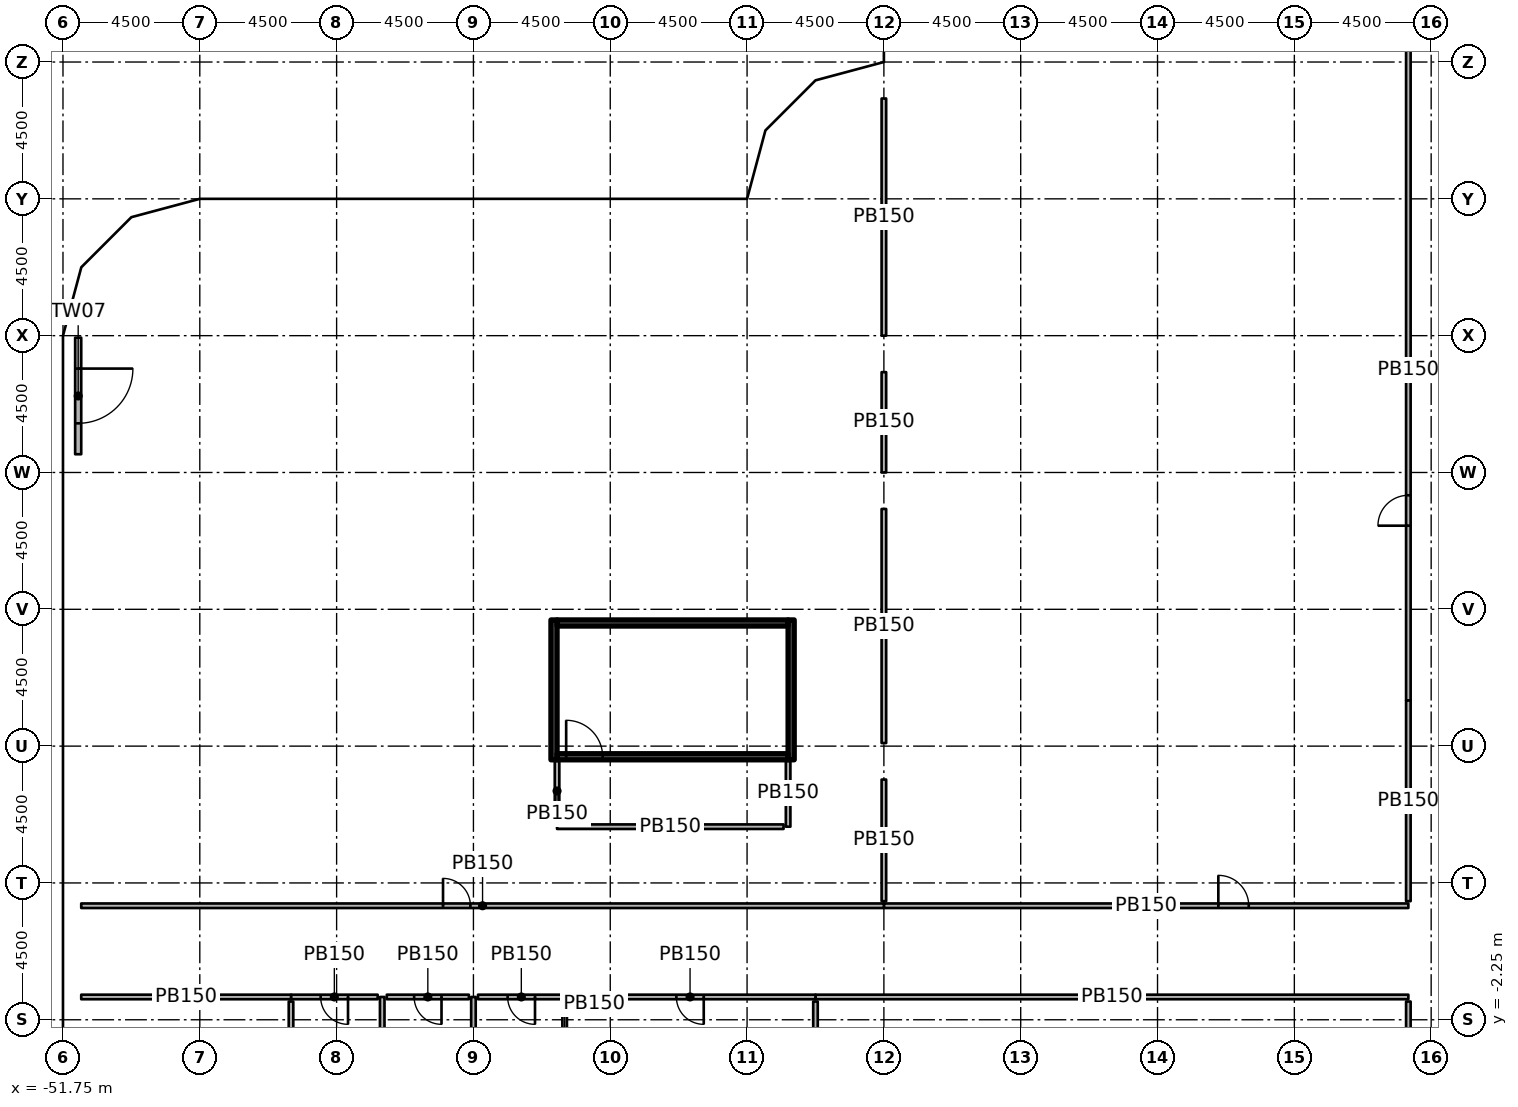
"""IFC4 building model, lengths in metres.
Left out: names, types, materials, properties, quantities, classifications, styles, units other than length and angle.
Written with IfcOpenShell. Run it as: python <this file> out.ifc"""

import sys

from ifc_helpers import new_model, si_unit, direction, frame, frame_2d, origin, origin_2d, place, context, subcontext, project, spatial, rectangle, extrude, element, fill, save


model = new_model("IFC4")
c1 = context("Model", 3, precision=1e-05, world=origin(), true_north=direction((0.0, 1.0)))
c2 = subcontext(c1, "Body", "Model", "MODEL_VIEW")
j1 = project(units=[si_unit("LENGTHUNIT", "METRE"), si_unit("PLANEANGLEUNIT", "RADIAN")], contexts=[c1])
p1 = place(None, origin())
s1 = spatial("IfcSite", under=j1, at=p1, CompositionType="ELEMENT")
p2 = place(p1, origin())
s2 = spatial("IfcBuilding", under=s1, at=p2, CompositionType="ELEMENT")
p3 = place(p2, frame((0.0, 0.0, 7.0)))
s3 = spatial("IfcBuildingStorey", under=s2, at=p3, CompositionType="ELEMENT", Elevation=7.0)
for number, where, z_axis, x_axis in (
    (1, (-51.15, 2.25, 0.0), (0.0, 0.0, 1.0), (1.0, 0.0, 0.0)),
    (2, (-51.15, 15.75, 0.0), (0.0, 0.0, 1.0), (1.0, 0.0, 0.0)),
    (3, (-46.65, -2.25, 0.0), (0.0, 0.0, 1.0), (1.0, 0.0, 0.0)),
    (4, (-46.65, 11.25, 0.0), (0.0, 0.0, 1.0), (1.0, 0.0, 0.0)),
    (5, (-47.25, 23.97, 0.0), (0.0, 0.0, 1.0), (1.0, 0.0, 0.0)),
    (6, (-42.15, 6.75, 0.0), (0.0, 0.0, 1.0), (1.0, 0.0, 0.0)),
    (7, (-42.75, 19.47, 0.0), (0.0, 0.0, 1.0), (1.0, 0.0, 0.0)),
    (8, (-37.65, 2.25, 0.0), (0.0, 0.0, 1.0), (1.0, 0.0, 0.0)),
    (9, (-38.25, 14.97, 0.0), (0.0, 0.0, 1.0), (1.0, 0.0, 0.0)),
    (10, (-33.11, -2.25, 0.0), (0.0, 0.0, 1.0), (1.0, 0.0, 0.0)),
    (11, (-33.11, 2.25, 0.0), (0.0, 0.0, 1.0), (1.0, 0.0, 0.0)),
    (12, (-33.75, 24.15, 0.0), (0.0, 0.0, 1.0), (1.0, 0.0, 0.0)),
    (13, (-28.908, 5.475, 0.0), (0.0, 0.0, 1.0), (1.0, 0.0, 0.0)),
    (14, (-29.25, 19.65, 0.0), (0.0, 0.0, 1.0), (1.0, 0.0, 0.0)),
    (15, (-28.65, 24.15, 0.0), (0.0, 0.0, 1.0), (1.0, 0.0, 0.0)),
    (16, (-24.75, 6.25, 0.0), (0.0, 0.0, 1.0), (1.0, 0.0, 0.0)),
    (17, (-24.75, 15.15, 0.0), (0.0, 0.0, 1.0), (1.0, 0.0, 0.0)),
    (18, (-24.15, 19.65, 0.0), (0.0, 0.0, 1.0), (1.0, 0.0, 0.0)),
    (19, (-24.15, 28.65, 0.0), (0.0, 0.0, 1.0), (1.0, 0.0, 0.0)),
    (20, (-20.25, 6.11, 0.0), (0.0, 0.0, 1.0), (1.0, 0.0, 0.0)),
    (21, (-20.25, 10.65, 0.0), (0.0, 0.0, 1.0), (1.0, 0.0, 0.0)),
    (22, (-19.65, 15.15, 0.0), (0.0, 0.0, 1.0), (1.0, 0.0, 0.0)),
    (23, (-19.65, 24.15, 0.0), (0.0, 0.0, 1.0), (1.0, 0.0, 0.0)),
    (24, (-15.75, 6.25, 0.0), (0.0, 0.0, 1.0), (1.0, 0.0, 0.0)),
    (25, (-15.15, 10.65, 0.0), (0.0, 0.0, 1.0), (1.0, 0.0, 0.0)),
    (26, (-15.15, 19.65, 0.0), (0.0, 0.0, 1.0), (1.0, 0.0, 0.0)),
    (27, (-10.75, 6.25, 0.0), (0.0, 0.0, 1.0), (1.0, 0.0, 0.0)),
    (28, (-10.65, 15.15, 0.0), (0.0, 0.0, 1.0), (1.0, 0.0, 0.0)),
    (29, (-10.65, 29.25, 0.0), (0.0, 0.0, 1.0), (1.0, 0.0, 0.0)),
    (30, (-6.25, 6.25, 0.0), (0.0, 0.0, 1.0), (1.0, 0.0, 0.0)),
    (31, (-6.25, 10.75, 0.0), (0.0, 0.0, 1.0), (1.0, 0.0, 0.0)),
    (32, (-6.25, 15.75, 0.0), (0.0, 0.0, 1.0), (1.0, 0.0, 0.0)),
    (33, (-6.25, 20.25, 0.0), (0.0, 0.0, 1.0), (1.0, 0.0, 0.0)),
    (34, (-6.25, 24.65, 0.0), (0.0, 0.0, 1.0), (1.0, 0.0, 0.0)),
    (35, (-6.25, 26.7, 0.0), (0.0, 0.0, 1.0), (1.0, 0.0, 0.0)),
):
    element("IfcColumn", number, at=place(p3, frame(where, z_axis=z_axis, x_axis=x_axis)), inside=s3, PredefinedType="COLUMN", context=c2, shape_type="SweptSolid", body=[
        extrude(rectangle(XDim=1.2, YDim=1.2, at=origin_2d()), origin(), (0.0, 0.0, 1.0), 4.55),
    ])
p4 = place(p3, frame((-51.25, 20.184, 0.0), z_axis=(0.0, 0.0, 1.0), x_axis=(0.0, -1.0, 0.0)))
e36 = element("IfcWall", 36, at=p4, inside=s3, PredefinedType="SOLIDWALL", context=c2, shape_type="SweptSolid", body=[
    extrude(rectangle(XDim=3.834, YDim=0.2, at=frame_2d((1.917, 0.0))), origin(), (0.0, 0.0, 1.0), 4.55),
])
p5 = place(p4, frame((1.017, 0.0, 0.0)))
e37 = element("IfcOpeningElement", 37, at=p5, cuts=e36, PredefinedType="OPENING", context=c2, shape_type="SweptSolid", body=[
    extrude(rectangle(XDim=1.8, YDim=2.4, at=frame_2d((0.9, 1.2))), frame((0.0, 0.11, 0.0), z_axis=(0.0, -1.0, 0.0), x_axis=(1.0, 0.0, 0.0)), (0.0, 0.0, 1.0), 0.22),
])
for number, where, z_axis, x_axis in (
    (38, (-35.6, 6.3, 0.0), (0.0, 0.0, 1.0), (0.0, 1.0, 0.0)),
    (39, (-27.8, 6.3, 0.0), (0.0, 0.0, 1.0), (0.0, 1.0, 0.0)),
):
    element("IfcWall", number, at=place(p3, frame(where, z_axis=z_axis, x_axis=x_axis)), inside=s3, PredefinedType="SHEAR", context=c2, shape_type="SweptSolid", body=[
        extrude(rectangle(XDim=4.6, YDim=0.2, at=frame_2d((2.3, 0.0))), origin(), (0.0, 0.0, 1.0), 4.55),
    ])
p6 = place(p3, frame((-35.5, 6.4, 0.0), z_axis=(0.0, 0.0, 1.0), x_axis=(1.0, 0.0, 0.0)))
e40 = element("IfcWall", 40, at=p6, inside=s3, PredefinedType="SHEAR", context=c2, shape_type="SweptSolid", body=[
    extrude(rectangle(XDim=7.6, YDim=0.2, at=frame_2d((3.8, 0.0))), origin(), (0.0, 0.0, 1.0), 4.55),
])
p7 = place(p6, frame((0.3, 0.0, 0.0)))
e41 = element("IfcOpeningElement", 41, at=p7, cuts=e40, PredefinedType="OPENING", context=c2, shape_type="SweptSolid", body=[
    extrude(rectangle(XDim=1.2, YDim=2.1, at=frame_2d((0.6, 1.05))), frame((0.0, 0.11, 0.0), z_axis=(0.0, -1.0, 0.0), x_axis=(1.0, 0.0, 0.0)), (0.0, 0.0, 1.0), 0.22),
])
p8 = place(p3, frame((-35.5, 10.8, 0.0), z_axis=(0.0, 0.0, 1.0), x_axis=(1.0, 0.0, 0.0)))
e42 = element("IfcWall", 42, at=p8, inside=s3, PredefinedType="SHEAR", context=c2, shape_type="SweptSolid", body=[
    extrude(rectangle(XDim=7.6, YDim=0.2, at=frame_2d((3.8, 0.0))), origin(), (0.0, 0.0, 1.0), 4.55),
])
p9 = place(p3, frame((-27.9, 6.3, 0.0), z_axis=(0.0, 0.0, 1.0), x_axis=(0.0, -1.0, 0.0)))
e43 = element("IfcWall", 43, at=p9, inside=s3, PredefinedType="PARTITIONING", context=c2, shape_type="SweptSolid", body=[
    extrude(rectangle(XDim=2.2, YDim=0.15, at=frame_2d((1.1, 0.0))), origin(), (0.0, 0.0, 1.0), 4.55),
])
p10 = place(p3, frame((-28.05, 4.1, 0.0), z_axis=(0.0, 0.0, 1.0), x_axis=(-1.0, 0.0, 0.0)))
e44 = element("IfcWall", 44, at=p10, inside=s3, PredefinedType="PARTITIONING", context=c2, shape_type="SweptSolid", body=[
    extrude(rectangle(XDim=7.45, YDim=0.15, at=frame_2d((3.725, 0.0))), origin(), (0.0, 0.0, 1.0), 4.55),
])
p11 = place(p3, frame((-35.5, 4.25, 0.0), z_axis=(0.0, 0.0, 1.0), x_axis=(0.0, 1.0, 0.0)))
e45 = element("IfcWall", 45, at=p11, inside=s3, PredefinedType="PARTITIONING", context=c2, shape_type="SweptSolid", body=[
    extrude(rectangle(XDim=2.05, YDim=0.15, at=frame_2d((1.025, 0.0))), origin(), (0.0, 0.0, 1.0), 4.55),
])
p12 = place(p3, frame((-41.25, -1.5, 0.0), z_axis=(0.0, 0.0, 1.0), x_axis=(0.0, -1.0, 0.0)))
e46 = element("IfcWall", 46, at=p12, inside=s3, PredefinedType="PARTITIONING", context=c2, shape_type="SweptSolid", body=[
    extrude(rectangle(XDim=6.0, YDim=0.15, at=frame_2d((3.0, 0.0))), origin(), (0.0, 0.0, 1.0), 4.55),
])
p13 = place(p3, frame((-41.4, -1.5, 0.0), z_axis=(0.0, 0.0, 1.0), x_axis=(-1.0, 0.0, 0.0)))
e47 = element("IfcWall", 47, at=p13, inside=s3, PredefinedType="PARTITIONING", context=c2, shape_type="SweptSolid", body=[
    extrude(rectangle(XDim=2.85, YDim=0.15, at=frame_2d((1.425, 0.0))), origin(), (0.0, 0.0, 1.0), 4.55),
])
p14 = place(p13, frame((0.975, 0.0, 0.0)))
e48 = element("IfcOpeningElement", 48, at=p14, cuts=e47, PredefinedType="OPENING", context=c2, shape_type="SweptSolid", body=[
    extrude(rectangle(XDim=0.9, YDim=2.1, at=frame_2d((0.45, 1.05))), frame((0.0, 0.085, 0.0), z_axis=(0.0, -1.0, 0.0), x_axis=(1.0, 0.0, 0.0)), (0.0, 0.0, 1.0), 0.17),
])
p15 = place(p3, frame((-44.25, -7.35, 0.0), z_axis=(0.0, 0.0, 1.0), x_axis=(0.0, 1.0, 0.0)))
e49 = element("IfcWall", 49, at=p15, inside=s3, PredefinedType="PARTITIONING", context=c2, shape_type="SweptSolid", body=[
    extrude(rectangle(XDim=5.7, YDim=0.15, at=frame_2d((2.85, 0.0))), origin(), (0.0, 0.0, 1.0), 4.55),
])
p16 = place(p3, frame((-38.25, -1.5, 0.0), z_axis=(0.0, 0.0, 1.0), x_axis=(0.0, -1.0, 0.0)))
e50 = element("IfcWall", 50, at=p16, inside=s3, PredefinedType="PARTITIONING", context=c2, shape_type="SweptSolid", body=[
    extrude(rectangle(XDim=6.0, YDim=0.15, at=frame_2d((3.0, 0.0))), origin(), (0.0, 0.0, 1.0), 4.55),
])
p17 = place(p3, frame((-38.4, -1.5, 0.0), z_axis=(0.0, 0.0, 1.0), x_axis=(-1.0, 0.0, 0.0)))
e51 = element("IfcWall", 51, at=p17, inside=s3, PredefinedType="PARTITIONING", context=c2, shape_type="SweptSolid", body=[
    extrude(rectangle(XDim=2.7, YDim=0.15, at=frame_2d((1.35, 0.0))), origin(), (0.0, 0.0, 1.0), 4.55),
])
p18 = place(p17, frame((0.9, 0.0, 0.0)))
e52 = element("IfcOpeningElement", 52, at=p18, cuts=e51, PredefinedType="OPENING", context=c2, shape_type="SweptSolid", body=[
    extrude(rectangle(XDim=0.9, YDim=2.1, at=frame_2d((0.45, 1.05))), frame((0.0, 0.085, 0.0), z_axis=(0.0, -1.0, 0.0), x_axis=(1.0, 0.0, 0.0)), (0.0, 0.0, 1.0), 0.17),
])
p19 = place(p3, frame((-35.25, -1.5, 0.0), z_axis=(0.0, 0.0, 1.0), x_axis=(-1.0, 0.0, 0.0)))
e53 = element("IfcWall", 53, at=p19, inside=s3, PredefinedType="PARTITIONING", context=c2, shape_type="SweptSolid", body=[
    extrude(rectangle(XDim=2.85, YDim=0.15, at=frame_2d((1.425, 0.0))), origin(), (0.0, 0.0, 1.0), 4.55),
])
p20 = place(p19, frame((0.975, 0.0, 0.0)))
e54 = element("IfcOpeningElement", 54, at=p20, cuts=e53, PredefinedType="OPENING", context=c2, shape_type="SweptSolid", body=[
    extrude(rectangle(XDim=0.9, YDim=2.1, at=frame_2d((0.45, 1.05))), frame((0.0, 0.085, 0.0), z_axis=(0.0, -1.0, 0.0), x_axis=(1.0, 0.0, 0.0)), (0.0, 0.0, 1.0), 0.17),
])
p21 = place(p3, frame((-35.25, -1.65, 0.0), z_axis=(0.0, 0.0, 1.0), x_axis=(0.0, -1.0, 0.0)))
e55 = element("IfcWall", 55, at=p21, inside=s3, PredefinedType="PARTITIONING", context=c2, shape_type="SweptSolid", body=[
    extrude(rectangle(XDim=2.1, YDim=0.15, at=frame_2d((1.05, 0.0))), origin(), (0.0, 0.0, 1.0), 4.55),
])
p22 = place(p3, frame((-7.5, 8.25, 0.0), z_axis=(0.0, 0.0, 1.0), x_axis=(0.0, 1.0, 0.0)))
e56 = element("IfcWall", 56, at=p22, inside=s3, PredefinedType="PARTITIONING", context=c2, shape_type="SweptSolid", body=[
    extrude(rectangle(XDim=21.75, YDim=0.15, at=frame_2d((10.875, 0.0))), origin(), (0.0, 0.0, 1.0), 4.55),
])
p23 = place(p22, frame((5.75, 0.0, 0.0)))
e57 = element("IfcOpeningElement", 57, at=p23, cuts=e56, PredefinedType="OPENING", context=c2, shape_type="SweptSolid", body=[
    extrude(rectangle(XDim=1.0, YDim=2.1, at=frame_2d((0.5, 1.05))), frame((0.0, 0.085, 0.0), z_axis=(0.0, -1.0, 0.0), x_axis=(1.0, 0.0, 0.0)), (0.0, 0.0, 1.0), 0.17),
])
p24 = place(p3, frame((-24.75, 1.5, 0.0), z_axis=(0.0, 0.0, 1.0), x_axis=(1.0, 0.0, 0.0)))
e58 = element("IfcWall", 58, at=p24, inside=s3, PredefinedType="PARTITIONING", context=c2, shape_type="SweptSolid", body=[
    extrude(rectangle(XDim=17.25, YDim=0.15, at=frame_2d((8.625, 0.0))), origin(), (0.0, 0.0, 1.0), 4.55),
])
p25 = place(p24, frame((11.0, 0.0, 0.0)))
e59 = element("IfcOpeningElement", 59, at=p25, cuts=e58, PredefinedType="OPENING", context=c2, shape_type="SweptSolid", body=[
    extrude(rectangle(XDim=1.0, YDim=2.1, at=frame_2d((0.5, 1.05))), frame((0.0, 0.085, 0.0), z_axis=(0.0, -1.0, 0.0), x_axis=(1.0, 0.0, 0.0)), (0.0, 0.0, 1.0), 0.17),
])
p26 = place(p3, frame((-51.15, 1.5, 0.0), z_axis=(0.0, 0.0, 1.0), x_axis=(1.0, 0.0, 0.0)))
e60 = element("IfcWall", 60, at=p26, inside=s3, PredefinedType="PARTITIONING", context=c2, shape_type="SweptSolid", body=[
    extrude(rectangle(XDim=26.4, YDim=0.15, at=frame_2d((13.2, 0.0))), origin(), (0.0, 0.0, 1.0), 4.55),
])
p27 = place(p26, frame((11.9, 0.0, 0.0)))
e61 = element("IfcOpeningElement", 61, at=p27, cuts=e60, PredefinedType="OPENING", context=c2, shape_type="SweptSolid", body=[
    extrude(rectangle(XDim=0.9, YDim=2.1, at=frame_2d((0.45, 1.05))), frame((0.0, 0.085, 0.0), z_axis=(0.0, -1.0, 0.0), x_axis=(1.0, 0.0, 0.0)), (0.0, 0.0, 1.0), 0.17),
])
p28 = place(p3, frame((-7.5, -1.5, 0.0), z_axis=(0.0, 0.0, 1.0), x_axis=(-1.0, 0.0, 0.0)))
e62 = element("IfcWall", 62, at=p28, inside=s3, PredefinedType="PARTITIONING", context=c2, shape_type="SweptSolid", body=[
    extrude(rectangle(XDim=19.5, YDim=0.15, at=frame_2d((9.75, 0.0))), origin(), (0.0, 0.0, 1.0), 4.55),
])
p29 = place(p3, frame((-44.25, -1.5, 0.0), z_axis=(0.0, 0.0, 1.0), x_axis=(-1.0, 0.0, 0.0)))
e63 = element("IfcWall", 63, at=p29, inside=s3, PredefinedType="PARTITIONING", context=c2, shape_type="SweptSolid", body=[
    extrude(rectangle(XDim=6.9, YDim=0.15, at=frame_2d((3.45, 0.0))), origin(), (0.0, 0.0, 1.0), 4.55),
])
p30 = place(p3, frame((-27.0, -1.5, 0.0), z_axis=(0.0, 0.0, 1.0), x_axis=(-1.0, 0.0, 0.0)))
e64 = element("IfcWall", 64, at=p30, inside=s3, PredefinedType="PARTITIONING", context=c2, shape_type="SweptSolid", body=[
    extrude(rectangle(XDim=8.25, YDim=0.15, at=frame_2d((4.125, 0.0))), origin(), (0.0, 0.0, 1.0), 4.55),
])
p31 = place(p30, frame((3.675, 0.0, 0.0)))
e65 = element("IfcOpeningElement", 65, at=p31, cuts=e64, PredefinedType="OPENING", context=c2, shape_type="SweptSolid", body=[
    extrude(rectangle(XDim=0.9, YDim=2.1, at=frame_2d((0.45, 1.05))), frame((0.0, 0.085, 0.0), z_axis=(0.0, -1.0, 0.0), x_axis=(1.0, 0.0, 0.0)), (0.0, 0.0, 1.0), 0.17),
])
p32 = place(p3, frame((-24.75, 1.65, 0.0), z_axis=(0.0, 0.0, 1.0), x_axis=(0.0, 1.0, 0.0)))
e66 = element("IfcWall", 66, at=p32, inside=s3, PredefinedType="PARTITIONING", context=c2, shape_type="SweptSolid", body=[
    extrude(rectangle(XDim=4.0, YDim=0.15, at=frame_2d((2.0, 0.0))), origin(), (0.0, 0.0, 1.0), 4.55),
])
p33 = place(p3, frame((-24.75, 6.85, 0.0), z_axis=(0.0, 0.0, 1.0), x_axis=(0.0, 1.0, 0.0)))
e67 = element("IfcWall", 67, at=p33, inside=s3, PredefinedType="PARTITIONING", context=c2, shape_type="SweptSolid", body=[
    extrude(rectangle(XDim=7.7, YDim=0.15, at=frame_2d((3.85, 0.0))), origin(), (0.0, 0.0, 1.0), 4.55),
])
p34 = place(p3, frame((-24.75, 15.75, 0.0), z_axis=(0.0, 0.0, 1.0), x_axis=(0.0, 1.0, 0.0)))
e68 = element("IfcWall", 68, at=p34, inside=s3, PredefinedType="PARTITIONING", context=c2, shape_type="SweptSolid", body=[
    extrude(rectangle(XDim=3.3, YDim=0.15, at=frame_2d((1.65, 0.0))), origin(), (0.0, 0.0, 1.0), 4.55),
])
p35 = place(p3, frame((-24.75, 20.25, 0.0), z_axis=(0.0, 0.0, 1.0), x_axis=(0.0, 1.0, 0.0)))
e69 = element("IfcWall", 69, at=p35, inside=s3, PredefinedType="PARTITIONING", context=c2, shape_type="SweptSolid", body=[
    extrude(rectangle(XDim=7.8, YDim=0.15, at=frame_2d((3.9, 0.0))), origin(), (0.0, 0.0, 1.0), 4.55),
])
p36 = place(p3, frame((-7.5, 8.25, 0.0), z_axis=(0.0, 0.0, 1.0), x_axis=(0.0, -1.0, 0.0)))
e70 = element("IfcWall", 70, at=p36, inside=s3, PredefinedType="PARTITIONING", context=c2, shape_type="SweptSolid", body=[
    extrude(rectangle(XDim=6.6, YDim=0.15, at=frame_2d((3.3, 0.0))), origin(), (0.0, 0.0, 1.0), 4.55),
])
p37 = place(p3, frame((-27.0, -27.797, 0.0), z_axis=(0.0, 0.0, 1.0), x_axis=(0.0, 1.0, 0.0)))
e71 = element("IfcWall", 71, at=p37, inside=s3, PredefinedType="PARTITIONING", context=c2, shape_type="SweptSolid", body=[
    extrude(rectangle(XDim=26.147, YDim=0.15, at=frame_2d((13.074, 0.0))), origin(), (0.0, 0.0, 1.0), 4.55),
])
p38 = place(p3, frame((-7.5, -1.65, 0.0), z_axis=(0.0, 0.0, 1.0), x_axis=(0.0, -1.0, 0.0)))
e72 = element("IfcWall", 72, at=p38, inside=s3, PredefinedType="PARTITIONING", context=c2, shape_type="SweptSolid", body=[
    extrude(rectangle(XDim=6.6, YDim=0.15, at=frame_2d((3.3, 0.0))), origin(), (0.0, 0.0, 1.0), 4.55),
])
p39 = place(p5, origin())
e73 = element("IfcDoor", 73, at=p39, inside=s3, OperationType="SINGLE_SWING_LEFT", PredefinedType="DOOR", context=c2, shape_type="SweptSolid", body=[
    extrude(rectangle(XDim=1.8, YDim=2.4, at=frame_2d((0.9, 1.2))), frame((0.0, 0.025, 0.0), z_axis=(0.0, -1.0, 0.0), x_axis=(1.0, 0.0, 0.0)), (0.0, 0.0, 1.0), 0.05),
])
fill(e37, e73)
p40 = place(p7, origin())
e74 = element("IfcDoor", 74, at=p40, inside=s3, OperationType="SINGLE_SWING_RIGHT", PredefinedType="DOOR", context=c2, shape_type="SweptSolid", body=[
    extrude(rectangle(XDim=1.2, YDim=2.1, at=frame_2d((0.6, 1.05))), frame((0.0, 0.025, 0.0), z_axis=(0.0, -1.0, 0.0), x_axis=(1.0, 0.0, 0.0)), (0.0, 0.0, 1.0), 0.05),
])
fill(e41, e74)
p41 = place(p14, origin())
e75 = element("IfcDoor", 75, at=p41, inside=s3, OperationType="SINGLE_SWING_LEFT", PredefinedType="DOOR", context=c2, shape_type="SweptSolid", body=[
    extrude(rectangle(XDim=0.9, YDim=2.1, at=frame_2d((0.45, 1.05))), frame((0.0, 0.025, 0.0), z_axis=(0.0, -1.0, 0.0), x_axis=(1.0, 0.0, 0.0)), (0.0, 0.0, 1.0), 0.05),
])
fill(e48, e75)
p42 = place(p18, origin())
e76 = element("IfcDoor", 76, at=p42, inside=s3, OperationType="SINGLE_SWING_LEFT", PredefinedType="DOOR", context=c2, shape_type="SweptSolid", body=[
    extrude(rectangle(XDim=0.9, YDim=2.1, at=frame_2d((0.45, 1.05))), frame((0.0, 0.025, 0.0), z_axis=(0.0, -1.0, 0.0), x_axis=(1.0, 0.0, 0.0)), (0.0, 0.0, 1.0), 0.05),
])
fill(e52, e76)
p43 = place(p20, origin())
e77 = element("IfcDoor", 77, at=p43, inside=s3, OperationType="SINGLE_SWING_LEFT", PredefinedType="DOOR", context=c2, shape_type="SweptSolid", body=[
    extrude(rectangle(XDim=0.9, YDim=2.1, at=frame_2d((0.45, 1.05))), frame((0.0, 0.025, 0.0), z_axis=(0.0, -1.0, 0.0), x_axis=(1.0, 0.0, 0.0)), (0.0, 0.0, 1.0), 0.05),
])
fill(e54, e77)
p44 = place(p23, origin())
e78 = element("IfcDoor", 78, at=p44, inside=s3, OperationType="SINGLE_SWING_LEFT", PredefinedType="DOOR", context=c2, shape_type="SweptSolid", body=[
    extrude(rectangle(XDim=1.0, YDim=2.1, at=frame_2d((0.5, 1.05))), frame((0.0, 0.025, 0.0), z_axis=(0.0, -1.0, 0.0), x_axis=(1.0, 0.0, 0.0)), (0.0, 0.0, 1.0), 0.05),
])
fill(e57, e78)
p45 = place(p25, origin())
e79 = element("IfcDoor", 79, at=p45, inside=s3, OperationType="SINGLE_SWING_LEFT", PredefinedType="DOOR", context=c2, shape_type="SweptSolid", body=[
    extrude(rectangle(XDim=1.0, YDim=2.1, at=frame_2d((0.5, 1.05))), frame((0.0, 0.025, 0.0), z_axis=(0.0, -1.0, 0.0), x_axis=(1.0, 0.0, 0.0)), (0.0, 0.0, 1.0), 0.05),
])
fill(e59, e79)
p46 = place(p27, origin())
e80 = element("IfcDoor", 80, at=p46, inside=s3, OperationType="SINGLE_SWING_LEFT", PredefinedType="DOOR", context=c2, shape_type="SweptSolid", body=[
    extrude(rectangle(XDim=0.9, YDim=2.1, at=frame_2d((0.45, 1.05))), frame((0.0, 0.025, 0.0), z_axis=(0.0, -1.0, 0.0), x_axis=(1.0, 0.0, 0.0)), (0.0, 0.0, 1.0), 0.05),
])
fill(e61, e80)
p47 = place(p31, origin())
e81 = element("IfcDoor", 81, at=p47, inside=s3, OperationType="SINGLE_SWING_LEFT", PredefinedType="DOOR", context=c2, shape_type="SweptSolid", body=[
    extrude(rectangle(XDim=0.9, YDim=2.1, at=frame_2d((0.45, 1.05))), frame((0.0, 0.025, 0.0), z_axis=(0.0, -1.0, 0.0), x_axis=(1.0, 0.0, 0.0)), (0.0, 0.0, 1.0), 0.05),
])
fill(e65, e81)
save(model, sys.argv[1])
